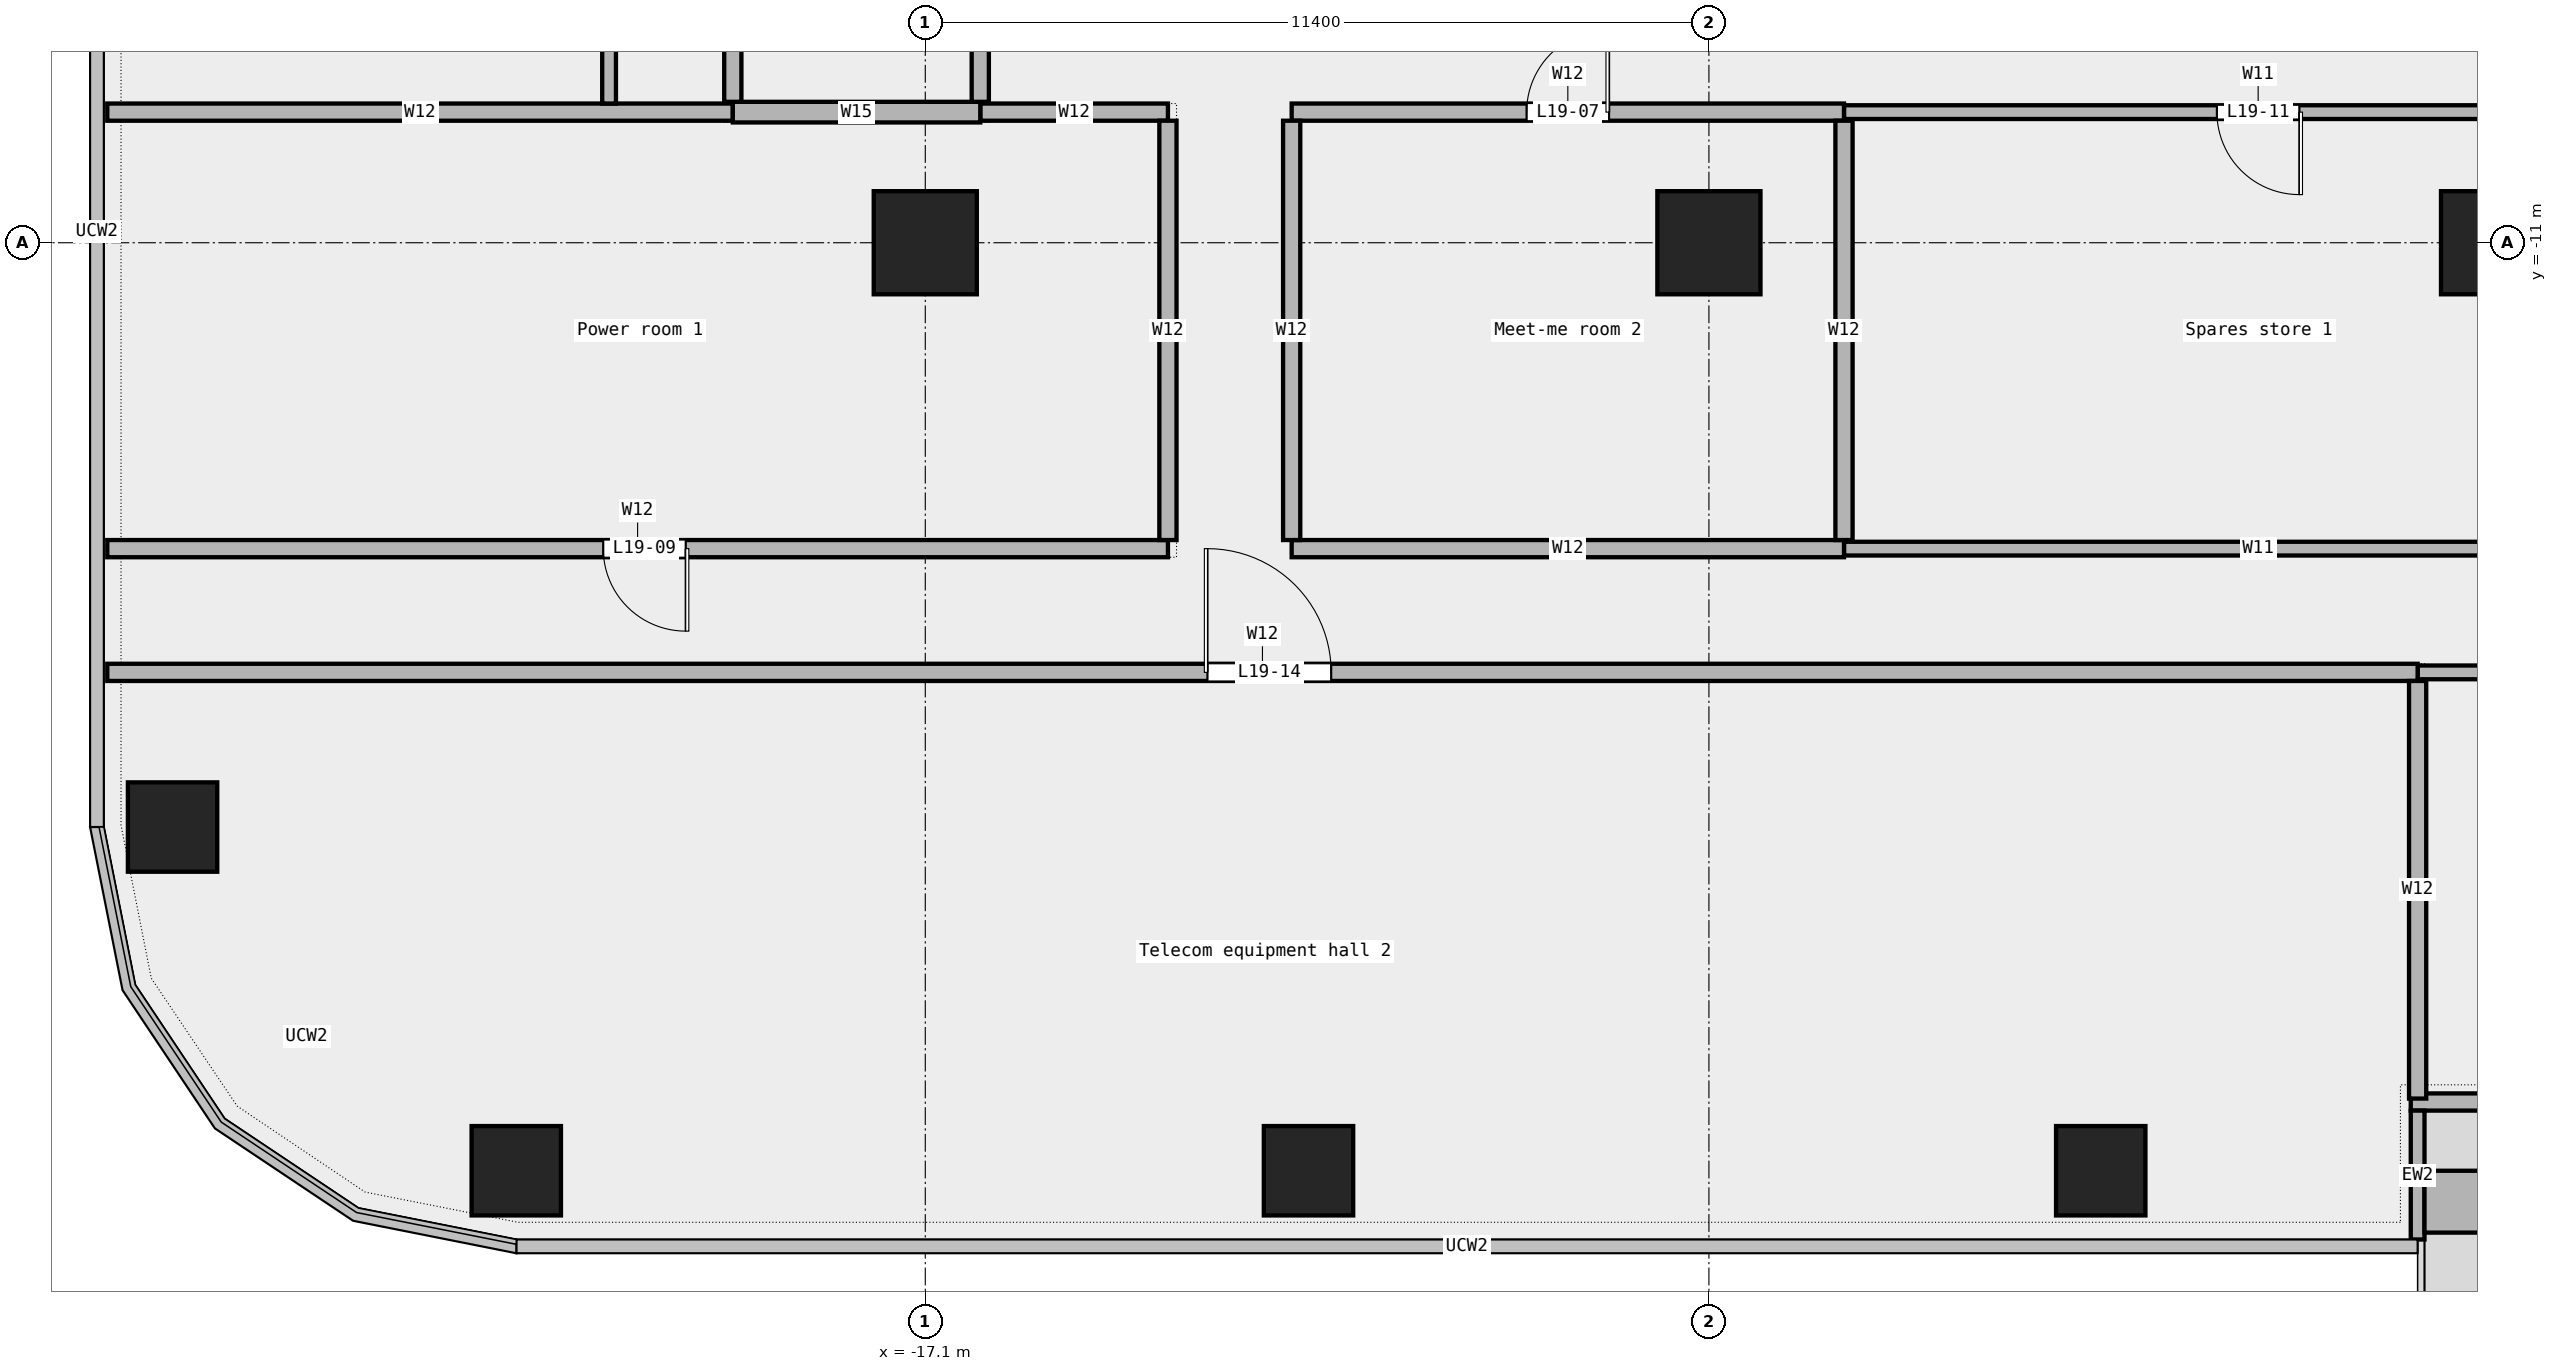
"""IFC4 building model, lengths in metres.
Left out: names, types, materials, properties, quantities, classifications, styles, units other than length and angle.
Written with IfcOpenShell. Run it as: python <this file> out.ifc"""

import sys

from ifc_helpers import new_model, si_unit, direction, frame, frame_2d, origin, origin_2d, place, context, subcontext, project, spatial, rectangle, extrude, element, fill, save


model = new_model("IFC4")
c1 = context("Model", 3, precision=1e-05, world=origin(), true_north=direction((0.0, 1.0)))
c2 = subcontext(c1, "Body", "Model", "MODEL_VIEW")
j1 = project(units=[si_unit("LENGTHUNIT", "METRE"), si_unit("PLANEANGLEUNIT", "RADIAN")], contexts=[c1])
p1 = place(None, origin())
s1 = spatial("IfcSite", under=j1, at=p1, CompositionType="ELEMENT")
p2 = place(p1, origin())
s2 = spatial("IfcBuilding", under=s1, at=p2, CompositionType="ELEMENT")
p3 = place(p2, frame((0.0, 0.0, 99.1)))
s3 = spatial("IfcBuildingStorey", under=s2, at=p3, CompositionType="ELEMENT", Elevation=99.1)
for number, where, z_axis, x_axis in (
    (1, (-23.05, -24.5, 0.0), (0.0, 0.0, 1.0), (1.0, 0.0, 0.0)),
    (2, (-11.525, -24.5, 0.0), (0.0, 0.0, 1.0), (1.0, 0.0, 0.0)),
    (3, (0.0, -24.5, 0.0), (0.0, 0.0, 1.0), (1.0, 0.0, 0.0)),
    (4, (-28.05, -19.5, 0.0), (0.0, 0.0, 1.0), (1.0, 0.0, 0.0)),
):
    element("IfcColumn", number, at=place(p3, frame(where, z_axis=z_axis, x_axis=x_axis)), inside=s3, PredefinedType="COLUMN", context=c2, shape_type="SweptSolid", body=[
        extrude(rectangle(XDim=1.3, YDim=1.3, at=origin_2d()), origin(), (0.0, 0.0, 1.0), 4.05),
    ])
for number, where, z_axis, x_axis in (
    (5, (-17.1, -11.0, 0.0), (0.0, 0.0, 1.0), (1.0, 0.0, 0.0)),
    (6, (-5.7, -11.0, 0.0), (0.0, 0.0, 1.0), (1.0, 0.0, 0.0)),
    (7, (5.7, -11.0, 0.0), (0.0, 0.0, 1.0), (1.0, 0.0, 0.0)),
):
    element("IfcColumn", number, at=place(p3, frame(where, z_axis=z_axis, x_axis=x_axis)), inside=s3, PredefinedType="COLUMN", context=c2, shape_type="SweptSolid", body=[
        extrude(rectangle(XDim=1.5, YDim=1.5, at=origin_2d()), origin(), (0.0, 0.0, 1.0), 4.05),
    ])
p4 = place(p3, frame((4.51, -23.5, 0.0), z_axis=(0.0, 0.0, 1.0), x_axis=(1.0, 0.0, 0.0)))
e8 = element("IfcWall", 8, at=p4, inside=s3, PredefinedType="STANDARD", context=c2, shape_type="SweptSolid", body=[
    extrude(rectangle(XDim=14.03, YDim=0.25, at=frame_2d((7.015, 0.0))), origin(), (0.0, 0.0, 1.0), 4.05),
])
p5 = place(p4, frame((1.75, 0.0, 0.45)))
e9 = element("IfcOpeningElement", 9, at=p5, cuts=e8, PredefinedType="OPENING", context=c2, shape_type="SweptSolid", body=[
    extrude(rectangle(XDim=1.5, YDim=3.0, at=frame_2d((0.75, 1.5))), frame((0.0, 0.137, 0.0), z_axis=(0.0, -1.0, 0.0), x_axis=(1.0, 0.0, 0.0)), (0.0, 0.0, 1.0), 0.274),
])
p6 = place(p4, frame((4.25, 0.0, 0.0)))
e10 = element("IfcOpeningElement", 10, at=p6, cuts=e8, PredefinedType="OPENING", context=c2, shape_type="SweptSolid", body=[
    extrude(rectangle(XDim=1.8, YDim=2.4, at=frame_2d((0.9, 1.2))), frame((0.0, 0.137, 0.0), z_axis=(0.0, -1.0, 0.0), x_axis=(1.0, 0.0, 0.0)), (0.0, 0.0, 1.0), 0.274),
])
p7 = place(p4, frame((10.75, 0.0, 0.45)))
e11 = element("IfcOpeningElement", 11, at=p7, cuts=e8, PredefinedType="OPENING", context=c2, shape_type="SweptSolid", body=[
    extrude(rectangle(XDim=1.5, YDim=3.0, at=frame_2d((0.75, 1.5))), frame((0.0, 0.137, 0.0), z_axis=(0.0, -1.0, 0.0), x_axis=(1.0, 0.0, 0.0)), (0.0, 0.0, 1.0), 0.274),
])
p8 = place(p3, frame((4.61, -25.5, 0.0), z_axis=(0.0, 0.0, 1.0), x_axis=(0.0, 1.0, 0.0)))
e12 = element("IfcWall", 12, at=p8, inside=s3, PredefinedType="STANDARD", context=c2, shape_type="SweptSolid", body=[
    extrude(rectangle(XDim=1.875, YDim=0.2, at=frame_2d((0.938, 0.0))), origin(), (0.0, 0.0, 1.0), 4.05),
])
p9 = place(p3, frame((4.71, -24.95, 0.0), z_axis=(0.0, 0.0, 1.0), x_axis=(1.0, 0.0, 0.0)))
e13 = element("IfcWall", 13, at=p9, inside=s3, PredefinedType="STANDARD", context=c2, shape_type="SweptSolid", body=[
    extrude(rectangle(XDim=3.6, YDim=0.9, at=frame_2d((1.8, 0.0))), origin(), (0.0, 0.0, 1.0), 0.7),
])
p10 = place(p3, frame((4.61, -17.25, 0.0), z_axis=(0.0, 0.0, 1.0), x_axis=(1.0, 0.0, 0.0)))
e14 = element("IfcWall", 14, at=p10, inside=s3, PredefinedType="PARTITIONING", context=c2, shape_type="SweptSolid", body=[
    extrude(rectangle(XDim=24.39, YDim=0.2, at=frame_2d((12.195, 0.0))), origin(), (0.0, 0.0, 1.0), 4.05),
])
p11 = place(p10, frame((6.315, 0.0, 0.0)))
e15 = element("IfcOpeningElement", 15, at=p11, cuts=e14, PredefinedType="OPENING", context=c2, shape_type="SweptSolid", body=[
    extrude(rectangle(XDim=1.2, YDim=2.1, at=frame_2d((0.6, 1.05))), frame((0.0, 0.112, 0.0), z_axis=(0.0, -1.0, 0.0), x_axis=(1.0, 0.0, 0.0)), (0.0, 0.0, 1.0), 0.224),
])
p12 = place(p10, frame((18.41, 0.0, 0.0)))
e16 = element("IfcOpeningElement", 16, at=p12, cuts=e14, PredefinedType="OPENING", context=c2, shape_type="SweptSolid", body=[
    extrude(rectangle(XDim=1.2, YDim=2.1, at=frame_2d((0.6, 1.05))), frame((0.0, 0.112, 0.0), z_axis=(0.0, -1.0, 0.0), x_axis=(1.0, 0.0, 0.0)), (0.0, 0.0, 1.0), 0.224),
])
p13 = place(p3, frame((-29.0, -17.25, 0.0), z_axis=(0.0, 0.0, 1.0), x_axis=(1.0, 0.0, 0.0)))
e17 = element("IfcWall", 17, at=p13, inside=s3, PredefinedType="PARTITIONING", context=c2, shape_type="SweptSolid", body=[
    extrude(rectangle(XDim=33.61, YDim=0.25, at=frame_2d((16.805, 0.0))), origin(), (0.0, 0.0, 1.0), 4.05),
])
p14 = place(p13, frame((16.005, 0.0, 0.0)))
e18 = element("IfcOpeningElement", 18, at=p14, cuts=e17, PredefinedType="OPENING", context=c2, shape_type="SweptSolid", body=[
    extrude(rectangle(XDim=1.8, YDim=2.1, at=frame_2d((0.9, 1.05))), frame((0.0, 0.137, 0.0), z_axis=(0.0, -1.0, 0.0), x_axis=(1.0, 0.0, 0.0)), (0.0, 0.0, 1.0), 0.274),
])
p15 = place(p3, frame((-3.735, -15.45, 0.0), z_axis=(0.0, 0.0, 1.0), x_axis=(1.0, 0.0, 0.0)))
e19 = element("IfcWall", 19, at=p15, inside=s3, PredefinedType="PARTITIONING", context=c2, shape_type="SweptSolid", body=[
    extrude(rectangle(XDim=12.05, YDim=0.2, at=frame_2d((6.025, 0.0))), origin(), (0.0, 0.0, 1.0), 4.05),
])
p16 = place(p3, frame((-29.0, -15.45, 0.0), z_axis=(0.0, 0.0, 1.0), x_axis=(1.0, 0.0, 0.0)))
e20 = element("IfcWall", 20, at=p16, inside=s3, PredefinedType="PARTITIONING", context=c2, shape_type="SweptSolid", body=[
    extrude(rectangle(XDim=15.43, YDim=0.25, at=frame_2d((7.715, 0.0))), origin(), (0.0, 0.0, 1.0), 4.05),
])
p17 = place(p16, frame((7.215, 0.0, 0.0)))
e21 = element("IfcOpeningElement", 21, at=p17, cuts=e20, PredefinedType="OPENING", context=c2, shape_type="SweptSolid", body=[
    extrude(rectangle(XDim=1.2, YDim=2.1, at=frame_2d((0.6, 1.05))), frame((0.0, 0.137, 0.0), z_axis=(0.0, -1.0, 0.0), x_axis=(1.0, 0.0, 0.0)), (0.0, 0.0, 1.0), 0.274),
])
p18 = place(p3, frame((-11.77, -15.45, 0.0), z_axis=(0.0, 0.0, 1.0), x_axis=(1.0, 0.0, 0.0)))
e22 = element("IfcWall", 22, at=p18, inside=s3, PredefinedType="PARTITIONING", context=c2, shape_type="SweptSolid", body=[
    extrude(rectangle(XDim=8.035, YDim=0.25, at=frame_2d((4.018, 0.0))), origin(), (0.0, 0.0, 1.0), 4.05),
])
p19 = place(p3, frame((-3.735, -9.1, 0.0), z_axis=(0.0, 0.0, 1.0), x_axis=(1.0, 0.0, 0.0)))
e23 = element("IfcWall", 23, at=p19, inside=s3, PredefinedType="PARTITIONING", context=c2, shape_type="SweptSolid", body=[
    extrude(rectangle(XDim=12.05, YDim=0.2, at=frame_2d((6.025, 0.0))), origin(), (0.0, 0.0, 1.0), 4.05),
])
p20 = place(p19, frame((5.425, 0.0, 0.0)))
e24 = element("IfcOpeningElement", 24, at=p20, cuts=e23, PredefinedType="OPENING", context=c2, shape_type="SweptSolid", body=[
    extrude(rectangle(XDim=1.2, YDim=2.1, at=frame_2d((0.6, 1.05))), frame((0.0, 0.112, 0.0), z_axis=(0.0, -1.0, 0.0), x_axis=(1.0, 0.0, 0.0)), (0.0, 0.0, 1.0), 0.224),
])
p21 = place(p3, frame((-29.0, -9.1, 0.0), z_axis=(0.0, 0.0, 1.0), x_axis=(1.0, 0.0, 0.0)))
e25 = element("IfcWall", 25, at=p21, inside=s3, PredefinedType="PARTITIONING", context=c2, shape_type="SweptSolid", body=[
    extrude(rectangle(XDim=9.1, YDim=0.25, at=frame_2d((4.55, 0.0))), origin(), (0.0, 0.0, 1.0), 4.05),
])
p22 = place(p3, frame((-16.3, -9.1, 0.0), z_axis=(0.0, 0.0, 1.0), x_axis=(1.0, 0.0, 0.0)))
e26 = element("IfcWall", 26, at=p22, inside=s3, PredefinedType="PARTITIONING", context=c2, shape_type="SweptSolid", body=[
    extrude(rectangle(XDim=2.73, YDim=0.25, at=frame_2d((1.365, 0.0))), origin(), (0.0, 0.0, 1.0), 4.05),
])
p23 = place(p3, frame((-11.77, -9.1, 0.0), z_axis=(0.0, 0.0, 1.0), x_axis=(1.0, 0.0, 0.0)))
e27 = element("IfcWall", 27, at=p23, inside=s3, PredefinedType="PARTITIONING", context=c2, shape_type="SweptSolid", body=[
    extrude(rectangle(XDim=8.035, YDim=0.25, at=frame_2d((4.018, 0.0))), origin(), (0.0, 0.0, 1.0), 4.05),
])
p24 = place(p23, frame((3.417, 0.0, 0.0)))
e28 = element("IfcOpeningElement", 28, at=p24, cuts=e27, PredefinedType="OPENING", context=c2, shape_type="SweptSolid", body=[
    extrude(rectangle(XDim=1.2, YDim=2.1, at=frame_2d((0.6, 1.05))), frame((0.0, 0.137, 0.0), z_axis=(0.0, -1.0, 0.0), x_axis=(1.0, 0.0, 0.0)), (0.0, 0.0, 1.0), 0.274),
])
p25 = place(p3, frame((-19.9, -9.1, 0.0), z_axis=(0.0, 0.0, 1.0), x_axis=(1.0, 0.0, 0.0)))
e29 = element("IfcWall", 29, at=p25, inside=s3, PredefinedType="PARTITIONING", context=c2, shape_type="SweptSolid", body=[
    extrude(rectangle(XDim=3.6, YDim=0.3, at=frame_2d((1.8, 0.0))), origin(), (0.0, 0.0, 1.0), 4.05),
])
p26 = place(p3, frame((-21.7, -8.975, 0.0), z_axis=(0.0, 0.0, 1.0), x_axis=(0.0, 1.0, 0.0)))
e30 = element("IfcWall", 30, at=p26, inside=s3, PredefinedType="PARTITIONING", context=c2, shape_type="SweptSolid", body=[
    extrude(rectangle(XDim=19.685, YDim=0.2, at=frame_2d((9.843, 0.0))), origin(), (0.0, 0.0, 1.0), 4.05),
])
p27 = place(p26, frame((2.805, 0.0, 0.0)))
e31 = element("IfcOpeningElement", 31, at=p27, cuts=e30, PredefinedType="OPENING", context=c2, shape_type="SweptSolid", body=[
    extrude(rectangle(XDim=1.2, YDim=2.1, at=frame_2d((0.6, 1.05))), frame((0.0, 0.112, 0.0), z_axis=(0.0, -1.0, 0.0), x_axis=(1.0, 0.0, 0.0)), (0.0, 0.0, 1.0), 0.224),
])
p28 = place(p26, frame((12.647, 0.0, 0.0)))
e32 = element("IfcOpeningElement", 32, at=p28, cuts=e30, PredefinedType="OPENING", context=c2, shape_type="SweptSolid", body=[
    extrude(rectangle(XDim=1.2, YDim=2.1, at=frame_2d((0.6, 1.05))), frame((0.0, 0.112, 0.0), z_axis=(0.0, -1.0, 0.0), x_axis=(1.0, 0.0, 0.0)), (0.0, 0.0, 1.0), 0.224),
])
p29 = place(p3, frame((-19.9, -8.95, 0.0), z_axis=(0.0, 0.0, 1.0), x_axis=(0.0, 1.0, 0.0)))
e33 = element("IfcWall", 33, at=p29, inside=s3, PredefinedType="PARTITIONING", context=c2, shape_type="SweptSolid", body=[
    extrude(rectangle(XDim=11.075, YDim=0.25, at=frame_2d((5.538, 0.0))), origin(), (0.0, 0.0, 1.0), 4.05),
])
p30 = place(p3, frame((-16.3, -8.95, 0.0), z_axis=(0.0, 0.0, 1.0), x_axis=(0.0, 1.0, 0.0)))
e34 = element("IfcWall", 34, at=p30, inside=s3, PredefinedType="PARTITIONING", context=c2, shape_type="SweptSolid", body=[
    extrude(rectangle(XDim=8.2, YDim=0.25, at=frame_2d((4.1, 0.0))), origin(), (0.0, 0.0, 1.0), 4.05),
])
p31 = place(p30, frame((3.65, 0.0, 0.0)))
e35 = element("IfcOpeningElement", 35, at=p31, cuts=e34, PredefinedType="OPENING", context=c2, shape_type="SweptSolid", body=[
    extrude(rectangle(XDim=0.9, YDim=2.1, at=frame_2d((0.45, 1.05))), frame((0.0, 0.137, 0.0), z_axis=(0.0, -1.0, 0.0), x_axis=(1.0, 0.0, 0.0)), (0.0, 0.0, 1.0), 0.274),
])
for number, where, z_axis, x_axis in (
    (36, (-13.57, -15.325, 0.0), (0.0, 0.0, 1.0), (0.0, 1.0, 0.0)),
    (37, (-11.77, -15.325, 0.0), (0.0, 0.0, 1.0), (0.0, 1.0, 0.0)),
    (38, (-3.735, -15.325, 0.0), (0.0, 0.0, 1.0), (0.0, 1.0, 0.0)),
):
    element("IfcWall", number, at=place(p3, frame(where, z_axis=z_axis, x_axis=x_axis)), inside=s3, PredefinedType="PARTITIONING", context=c2, shape_type="SweptSolid", body=[
        extrude(rectangle(XDim=6.1, YDim=0.25, at=frame_2d((3.05, 0.0))), origin(), (0.0, 0.0, 1.0), 4.05),
    ])
p32 = place(p3, frame((4.61, -23.45, 0.0), z_axis=(0.0, 0.0, 1.0), x_axis=(0.0, 1.0, 0.0)))
e39 = element("IfcWall", 39, at=p32, inside=s3, PredefinedType="PARTITIONING", context=c2, shape_type="SweptSolid", body=[
    extrude(rectangle(XDim=6.075, YDim=0.25, at=frame_2d((3.038, 0.0))), origin(), (0.0, 0.0, 1.0), 4.05),
])
p33 = place(p24, origin())
e40 = element("IfcDoor", 40, at=p33, inside=s3, OperationType="SINGLE_SWING_RIGHT", PredefinedType="DOOR", context=c2, shape_type="SweptSolid", body=[
    extrude(rectangle(XDim=1.2, YDim=2.1, at=frame_2d((0.6, 1.05))), frame((0.0, 0.025, 0.0), z_axis=(0.0, -1.0, 0.0), x_axis=(1.0, 0.0, 0.0)), (0.0, 0.0, 1.0), 0.05),
])
fill(e28, e40)
p34 = place(p17, origin())
e41 = element("IfcDoor", 41, at=p34, inside=s3, OperationType="SINGLE_SWING_LEFT", PredefinedType="DOOR", context=c2, shape_type="SweptSolid", body=[
    extrude(rectangle(XDim=1.2, YDim=2.1, at=frame_2d((0.6, 1.05))), frame((0.0, 0.025, 0.0), z_axis=(0.0, -1.0, 0.0), x_axis=(1.0, 0.0, 0.0)), (0.0, 0.0, 1.0), 0.05),
])
fill(e21, e41)
p35 = place(p20, origin())
e42 = element("IfcDoor", 42, at=p35, inside=s3, OperationType="SINGLE_SWING_LEFT", PredefinedType="DOOR", context=c2, shape_type="SweptSolid", body=[
    extrude(rectangle(XDim=1.2, YDim=2.1, at=frame_2d((0.6, 1.05))), frame((0.0, 0.025, 0.0), z_axis=(0.0, -1.0, 0.0), x_axis=(1.0, 0.0, 0.0)), (0.0, 0.0, 1.0), 0.05),
])
fill(e24, e42)
p36 = place(p14, origin())
e43 = element("IfcDoor", 43, at=p36, inside=s3, OperationType="DOUBLE_DOOR_SINGLE_SWING", PredefinedType="DOOR", context=c2, shape_type="SweptSolid", body=[
    extrude(rectangle(XDim=1.8, YDim=2.1, at=frame_2d((0.9, 1.05))), frame((0.0, 0.025, 0.0), z_axis=(0.0, -1.0, 0.0), x_axis=(1.0, 0.0, 0.0)), (0.0, 0.0, 1.0), 0.05),
])
fill(e18, e43)
save(model, sys.argv[1])
